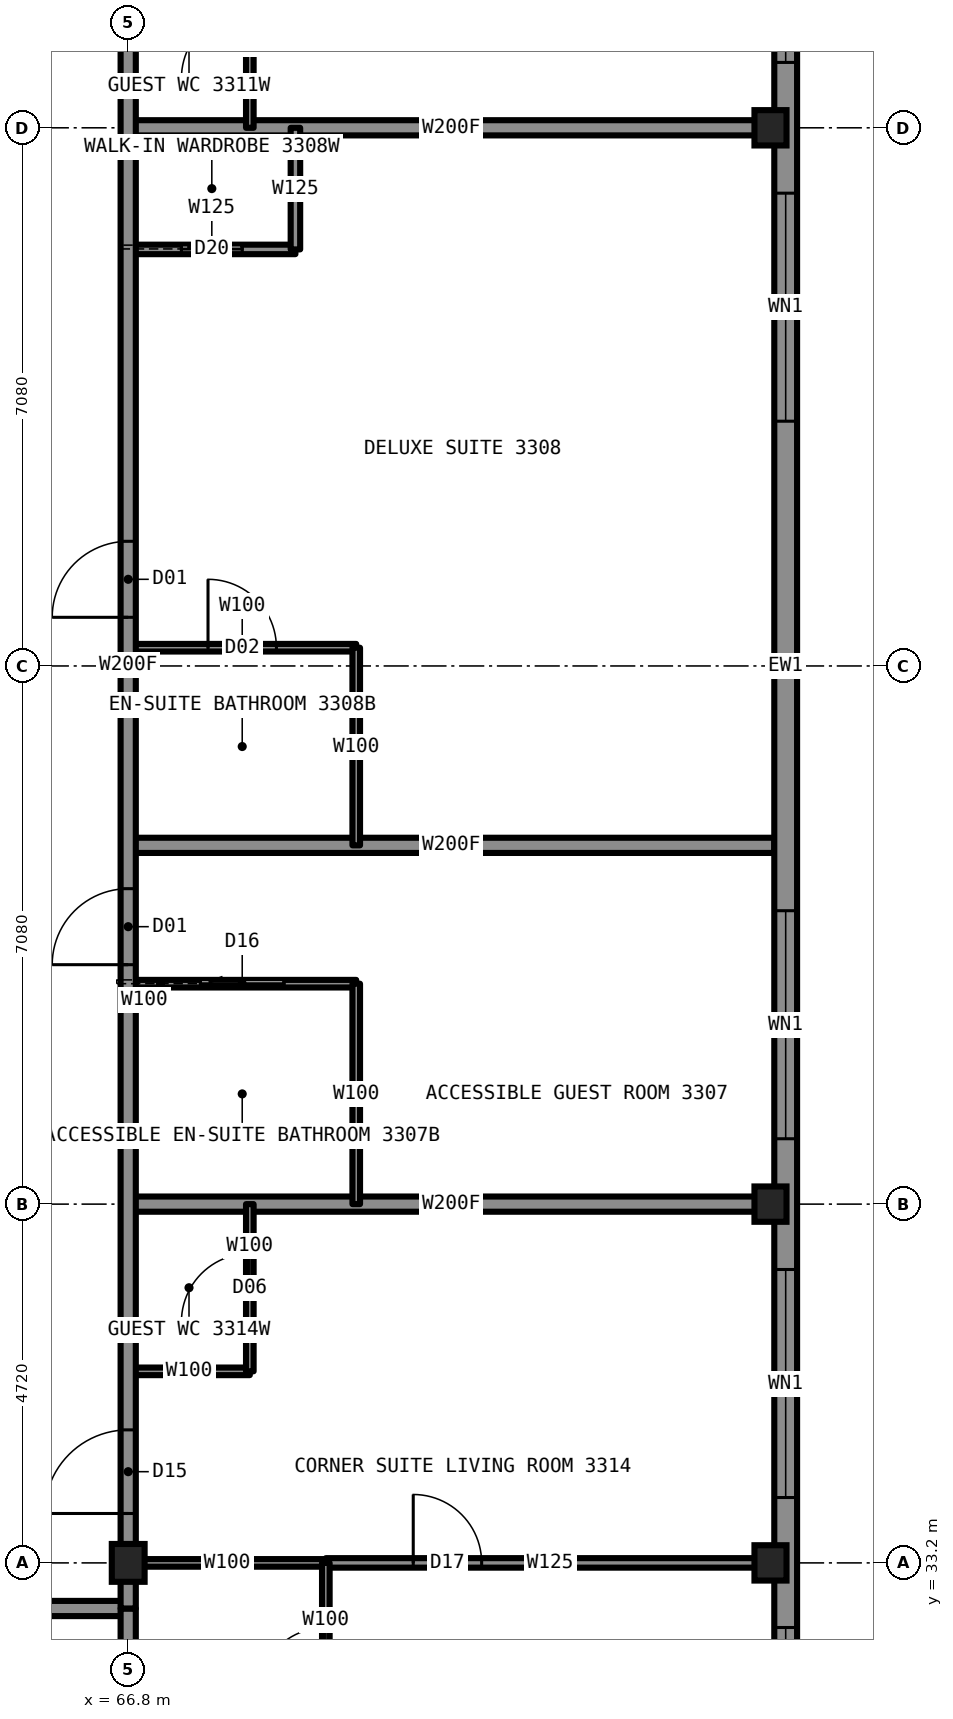
"""IFC4 building model, lengths in metres.
Left out: names, types, materials, properties, quantities, classifications, styles, units other than length and angle.
Written with IfcOpenShell. Run it as: python <this file> out.ifc"""

import sys

from ifc_helpers import new_model, si_unit, direction, frame, frame_2d, origin, origin_2d, place, context, subcontext, project, spatial, rectangle, i_section, extrude, element, fill, save


model = new_model("IFC4")
c1 = context("Model", 3, precision=1e-05, world=origin(), true_north=direction((0.0, 1.0)))
c2 = subcontext(c1, "Body", "Model", "MODEL_VIEW")
j1 = project(units=[si_unit("LENGTHUNIT", "METRE"), si_unit("PLANEANGLEUNIT", "RADIAN")], contexts=[c1])
p1 = place(None, origin())
s1 = spatial("IfcSite", under=j1, at=p1, CompositionType="ELEMENT")
p2 = place(p1, origin())
s2 = spatial("IfcBuilding", under=s1, at=p2, CompositionType="ELEMENT")
p3 = place(p2, frame((0.0, 0.0, 124.9)))
s3 = spatial("IfcBuildingStorey", under=s2, at=p3, CompositionType="ELEMENT", Elevation=124.9)
for number, where, z_axis, x_axis in (
    (1, (75.25, 33.2, 0.0), (0.0, 0.0, 1.0), (1.0, 0.0, 0.0)),
    (2, (75.25, 37.92, 0.0), (0.0, 0.0, 1.0), (1.0, 0.0, 0.0)),
    (3, (75.25, 52.08, 0.0), (0.0, 0.0, 1.0), (1.0, 0.0, 0.0)),
):
    element("IfcColumn", number, at=place(p3, frame(where, z_axis=z_axis, x_axis=x_axis)), inside=s3, PredefinedType="COLUMN", context=c2, shape_type="SweptSolid", body=[
        extrude(i_section(OverallWidth=0.422, OverallDepth=0.465, WebThickness=0.045, FlangeThickness=0.073, at=origin_2d()), origin(), (0.0, 0.0, 1.0), 3.5),
    ])
p4 = place(p3, frame((66.8, 33.2, 0.0), z_axis=(0.0, 0.0, 1.0), x_axis=(1.0, 0.0, 0.0)))
e4 = element("IfcColumn", 4, at=p4, inside=s3, PredefinedType="COLUMN", context=c2, shape_type="SweptSolid", body=[
    extrude(i_section(OverallWidth=0.432, OverallDepth=0.498, WebThickness=0.056, FlangeThickness=0.089, at=origin_2d()), origin(), (0.0, 0.0, 1.0), 3.5),
])
p5 = place(p3, frame((66.8, 33.2, 0.0), z_axis=(0.0, 0.0, 1.0), x_axis=(1.0, 0.0, 0.0)))
e5 = element("IfcWall", 5, at=p5, inside=s3, PredefinedType="PARTITIONING", context=c2, shape_type="SweptSolid", body=[
    extrude(rectangle(XDim=2.6, YDim=0.1, at=frame_2d((1.3, 0.0))), origin(), (0.0, 0.0, 1.0), 2.573),
])
p6 = place(p3, frame((69.4, 33.2, 0.0), z_axis=(0.0, 0.0, 1.0), x_axis=(1.0, 0.0, 0.0)))
e6 = element("IfcWall", 6, at=p6, inside=s3, PredefinedType="PARTITIONING", context=c2, shape_type="SweptSolid", body=[
    extrude(rectangle(XDim=5.9, YDim=0.125, at=frame_2d((2.95, 0.0))), origin(), (0.0, 0.0, 1.0), 2.573),
])
p7 = place(p6, frame((1.15, 0.0, 0.0)))
e7 = element("IfcOpeningElement", 7, at=p7, cuts=e6, PredefinedType="OPENING", context=c2, shape_type="SweptSolid", body=[
    extrude(rectangle(XDim=0.9, YDim=2.2, at=frame_2d((0.45, 1.1))), frame((0.0, 0.073, 0.0), z_axis=(0.0, -1.0, 0.0), x_axis=(1.0, 0.0, 0.0)), (0.0, 0.0, 1.0), 0.145),
])
p8 = place(p3, frame((43.2, 32.6, 0.0), z_axis=(0.0, 0.0, 1.0), x_axis=(1.0, 0.0, 0.0)))
e8 = element("IfcWall", 8, at=p8, inside=s3, PredefinedType="PARTITIONING", context=c2, shape_type="SweptSolid", body=[
    extrude(rectangle(XDim=23.6, YDim=0.2, at=frame_2d((11.8, 0.0))), origin(), (0.0, 0.0, 1.0), 3.33),
])
p9 = place(p8, frame((3.0, 0.0, 0.0)))
e9 = element("IfcOpeningElement", 9, at=p9, cuts=e8, PredefinedType="OPENING", context=c2, shape_type="SweptSolid", body=[
    extrude(rectangle(XDim=1.0, YDim=2.2, at=frame_2d((0.5, 1.1))), frame((0.0, 0.11, 0.0), z_axis=(0.0, -1.0, 0.0), x_axis=(1.0, 0.0, 0.0)), (0.0, 0.0, 1.0), 0.22),
])
p10 = place(p8, frame((11.29, 0.0, 0.0)))
e10 = element("IfcOpeningElement", 10, at=p10, cuts=e8, PredefinedType="OPENING", context=c2, shape_type="SweptSolid", body=[
    extrude(rectangle(XDim=1.1, YDim=2.2, at=frame_2d((0.55, 1.1))), frame((0.0, 0.11, 0.0), z_axis=(0.0, -1.0, 0.0), x_axis=(1.0, 0.0, 0.0)), (0.0, 0.0, 1.0), 0.22),
])
p11 = place(p3, frame((66.8, 42.64, 0.0), z_axis=(0.0, 0.0, 1.0), x_axis=(1.0, 0.0, 0.0)))
e11 = element("IfcWall", 11, at=p11, inside=s3, PredefinedType="PARTITIONING", context=c2, shape_type="SweptSolid", body=[
    extrude(rectangle(XDim=8.5, YDim=0.2, at=frame_2d((4.25, 0.0))), origin(), (0.0, 0.0, 1.0), 2.731),
])
p12 = place(p3, frame((66.8, 40.82, 0.0), z_axis=(0.0, 0.0, 1.0), x_axis=(1.0, 0.0, 0.0)))
e12 = element("IfcWall", 12, at=p12, inside=s3, PredefinedType="PARTITIONING", context=c2, shape_type="SweptSolid", body=[
    extrude(rectangle(XDim=3.0, YDim=0.1, at=frame_2d((1.5, 0.0))), origin(), (0.0, 0.0, 1.0), 3.33),
])
p13 = place(p12, frame((0.95, 0.0, 0.0)))
e13 = element("IfcOpeningElement", 13, at=p13, cuts=e12, PredefinedType="OPENING", context=c2, shape_type="SweptSolid", body=[
    extrude(rectangle(XDim=1.1, YDim=2.1, at=frame_2d((0.55, 1.05))), frame((0.0, 0.06, 0.0), z_axis=(0.0, -1.0, 0.0), x_axis=(1.0, 0.0, 0.0)), (0.0, 0.0, 1.0), 0.12),
])
p14 = place(p3, frame((66.8, 37.92, 0.0), z_axis=(0.0, 0.0, 1.0), x_axis=(1.0, 0.0, 0.0)))
e14 = element("IfcWall", 14, at=p14, inside=s3, PredefinedType="PARTITIONING", context=c2, shape_type="SweptSolid", body=[
    extrude(rectangle(XDim=8.5, YDim=0.2, at=frame_2d((4.25, 0.0))), origin(), (0.0, 0.0, 1.0), 2.573),
])
p15 = place(p3, frame((66.8, 35.72, 0.0), z_axis=(0.0, 0.0, 1.0), x_axis=(1.0, 0.0, 0.0)))
e15 = element("IfcWall", 15, at=p15, inside=s3, PredefinedType="PARTITIONING", context=c2, shape_type="SweptSolid", body=[
    extrude(rectangle(XDim=1.6, YDim=0.1, at=frame_2d((0.8, 0.0))), origin(), (0.0, 0.0, 1.0), 3.33),
])
p16 = place(p3, frame((66.8, 45.24, 0.0), z_axis=(0.0, 0.0, 1.0), x_axis=(1.0, 0.0, 0.0)))
e16 = element("IfcWall", 16, at=p16, inside=s3, PredefinedType="PARTITIONING", context=c2, shape_type="SweptSolid", body=[
    extrude(rectangle(XDim=3.0, YDim=0.1, at=frame_2d((1.5, 0.0))), origin(), (0.0, 0.0, 1.0), 3.33),
])
p17 = place(p16, frame((1.05, 0.0, 0.0)))
e17 = element("IfcOpeningElement", 17, at=p17, cuts=e16, PredefinedType="OPENING", context=c2, shape_type="SweptSolid", body=[
    extrude(rectangle(XDim=0.9, YDim=2.1, at=frame_2d((0.45, 1.05))), frame((0.0, 0.06, 0.0), z_axis=(0.0, -1.0, 0.0), x_axis=(1.0, 0.0, 0.0)), (0.0, 0.0, 1.0), 0.12),
])
p18 = place(p3, frame((66.8, 50.48, 0.0), z_axis=(0.0, 0.0, 1.0), x_axis=(1.0, 0.0, 0.0)))
e18 = element("IfcWall", 18, at=p18, inside=s3, PredefinedType="PARTITIONING", context=c2, shape_type="SweptSolid", body=[
    extrude(rectangle(XDim=2.2, YDim=0.125, at=frame_2d((1.1, 0.0))), origin(), (0.0, 0.0, 1.0), 3.33),
])
p19 = place(p18, frame((0.7, 0.0, 0.0)))
e19 = element("IfcOpeningElement", 19, at=p19, cuts=e18, PredefinedType="OPENING", context=c2, shape_type="SweptSolid", body=[
    extrude(rectangle(XDim=0.8, YDim=2.1, at=frame_2d((0.4, 1.05))), frame((0.0, 0.073, 0.0), z_axis=(0.0, -1.0, 0.0), x_axis=(1.0, 0.0, 0.0)), (0.0, 0.0, 1.0), 0.145),
])
p20 = place(p3, frame((66.8, 52.08, 0.0), z_axis=(0.0, 0.0, 1.0), x_axis=(1.0, 0.0, 0.0)))
e20 = element("IfcWall", 20, at=p20, inside=s3, PredefinedType="PARTITIONING", context=c2, shape_type="SweptSolid", body=[
    extrude(rectangle(XDim=8.5, YDim=0.2, at=frame_2d((4.25, 0.0))), origin(), (0.0, 0.0, 1.0), 2.573),
])
p21 = place(p3, frame((66.8, 33.22, 0.0), z_axis=(0.0, 0.0, 1.0), x_axis=(0.0, 1.0, 0.0)))
e21 = element("IfcWall", 21, at=p21, inside=s3, PredefinedType="PARTITIONING", context=c2, shape_type="SweptSolid", body=[
    extrude(rectangle(XDim=23.58, YDim=0.2, at=frame_2d((11.79, 0.0))), origin(), (0.0, 0.0, 1.0), 3.33),
])
p22 = place(p21, frame((7.85, 0.0, 0.0)))
e22 = element("IfcOpeningElement", 22, at=p22, cuts=e21, PredefinedType="OPENING", context=c2, shape_type="SweptSolid", body=[
    extrude(rectangle(XDim=1.0, YDim=2.2, at=frame_2d((0.5, 1.1))), frame((0.0, 0.11, 0.0), z_axis=(0.0, -1.0, 0.0), x_axis=(1.0, 0.0, 0.0)), (0.0, 0.0, 1.0), 0.22),
])
p23 = place(p21, frame((12.42, 0.0, 0.0)))
e23 = element("IfcOpeningElement", 23, at=p23, cuts=e21, PredefinedType="OPENING", context=c2, shape_type="SweptSolid", body=[
    extrude(rectangle(XDim=1.0, YDim=2.2, at=frame_2d((0.5, 1.1))), frame((0.0, 0.11, 0.0), z_axis=(0.0, -1.0, 0.0), x_axis=(1.0, 0.0, 0.0)), (0.0, 0.0, 1.0), 0.22),
])
p24 = place(p21, frame((21.83, 0.0, 0.0)))
e24 = element("IfcOpeningElement", 24, at=p24, cuts=e21, PredefinedType="OPENING", context=c2, shape_type="SweptSolid", body=[
    extrude(rectangle(XDim=1.1, YDim=2.2, at=frame_2d((0.55, 1.1))), frame((0.0, 0.11, 0.0), z_axis=(0.0, -1.0, 0.0), x_axis=(1.0, 0.0, 0.0)), (0.0, 0.0, 1.0), 0.22),
])
p25 = place(p21, frame((0.63, 0.0, 0.0)))
e25 = element("IfcOpeningElement", 25, at=p25, cuts=e21, PredefinedType="OPENING", context=c2, shape_type="SweptSolid", body=[
    extrude(rectangle(XDim=1.1, YDim=2.2, at=frame_2d((0.55, 1.1))), frame((0.0, 0.11, 0.0), z_axis=(0.0, -1.0, 0.0), x_axis=(1.0, 0.0, 0.0)), (0.0, 0.0, 1.0), 0.22),
])
p26 = place(p3, frame((66.8, 24.7, 0.0), z_axis=(0.0, 0.0, 1.0), x_axis=(0.0, 1.0, 0.0)))
e26 = element("IfcWall", 26, at=p26, inside=s3, PredefinedType="PARTITIONING", context=c2, shape_type="SweptSolid", body=[
    extrude(rectangle(XDim=7.9, YDim=0.2, at=frame_2d((3.95, 0.0))), origin(), (0.0, 0.0, 1.0), 2.573),
])
p27 = place(p3, frame((68.4, 35.72, 0.0), z_axis=(0.0, 0.0, 1.0), x_axis=(0.0, 1.0, 0.0)))
e27 = element("IfcWall", 27, at=p27, inside=s3, PredefinedType="PARTITIONING", context=c2, shape_type="SweptSolid", body=[
    extrude(rectangle(XDim=2.2, YDim=0.1, at=frame_2d((1.1, 0.0))), origin(), (0.0, 0.0, 1.0), 3.33),
])
p28 = place(p27, frame((0.65, 0.0, 0.0)))
e28 = element("IfcOpeningElement", 28, at=p28, cuts=e27, PredefinedType="OPENING", context=c2, shape_type="SweptSolid", body=[
    extrude(rectangle(XDim=0.9, YDim=2.1, at=frame_2d((0.45, 1.05))), frame((0.0, 0.06, 0.0), z_axis=(0.0, -1.0, 0.0), x_axis=(1.0, 0.0, 0.0)), (0.0, 0.0, 1.0), 0.12),
])
p29 = place(p3, frame((68.4, 52.08, 0.0), z_axis=(0.0, 0.0, 1.0), x_axis=(0.0, 1.0, 0.0)))
e29 = element("IfcWall", 29, at=p29, inside=s3, PredefinedType="PARTITIONING", context=c2, shape_type="SweptSolid", body=[
    extrude(rectangle(XDim=2.2, YDim=0.1, at=frame_2d((1.1, 0.0))), origin(), (0.0, 0.0, 1.0), 3.33),
])
p30 = place(p29, frame((0.65, 0.0, 0.0)))
e30 = element("IfcOpeningElement", 30, at=p30, cuts=e29, PredefinedType="OPENING", context=c2, shape_type="SweptSolid", body=[
    extrude(rectangle(XDim=0.9, YDim=2.1, at=frame_2d((0.45, 1.05))), frame((0.0, 0.06, 0.0), z_axis=(0.0, -1.0, 0.0), x_axis=(1.0, 0.0, 0.0)), (0.0, 0.0, 1.0), 0.12),
])
p31 = place(p3, frame((69.0, 50.48, 0.0), z_axis=(0.0, 0.0, 1.0), x_axis=(0.0, 1.0, 0.0)))
e31 = element("IfcWall", 31, at=p31, inside=s3, PredefinedType="PARTITIONING", context=c2, shape_type="SweptSolid", body=[
    extrude(rectangle(XDim=1.6, YDim=0.125, at=frame_2d((0.8, 0.0))), origin(), (0.0, 0.0, 1.0), 3.33),
])
p32 = place(p3, frame((69.4, 30.6, 0.0), z_axis=(0.0, 0.0, 1.0), x_axis=(0.0, 1.0, 0.0)))
e32 = element("IfcWall", 32, at=p32, inside=s3, PredefinedType="PARTITIONING", context=c2, shape_type="SweptSolid", body=[
    extrude(rectangle(XDim=2.6, YDim=0.1, at=frame_2d((1.3, 0.0))), origin(), (0.0, 0.0, 1.0), 3.33),
])
p33 = place(p32, frame((0.85, 0.0, 0.0)))
e33 = element("IfcOpeningElement", 33, at=p33, cuts=e32, PredefinedType="OPENING", context=c2, shape_type="SweptSolid", body=[
    extrude(rectangle(XDim=0.9, YDim=2.1, at=frame_2d((0.45, 1.05))), frame((0.0, 0.06, 0.0), z_axis=(0.0, -1.0, 0.0), x_axis=(1.0, 0.0, 0.0)), (0.0, 0.0, 1.0), 0.12),
])
p34 = place(p3, frame((69.8, 37.92, 0.0), z_axis=(0.0, 0.0, 1.0), x_axis=(0.0, 1.0, 0.0)))
e34 = element("IfcWall", 34, at=p34, inside=s3, PredefinedType="PARTITIONING", context=c2, shape_type="SweptSolid", body=[
    extrude(rectangle(XDim=2.9, YDim=0.1, at=frame_2d((1.45, 0.0))), origin(), (0.0, 0.0, 1.0), 3.33),
])
p35 = place(p3, frame((69.8, 42.64, 0.0), z_axis=(0.0, 0.0, 1.0), x_axis=(0.0, 1.0, 0.0)))
e35 = element("IfcWall", 35, at=p35, inside=s3, PredefinedType="PARTITIONING", context=c2, shape_type="SweptSolid", body=[
    extrude(rectangle(XDim=2.6, YDim=0.1, at=frame_2d((1.3, 0.0))), origin(), (0.0, 0.0, 1.0), 3.33),
])
p36 = place(p3, frame((75.45, 29.9, 0.0), z_axis=(0.0, 0.0, 1.0), x_axis=(0.0, 1.0, 0.0)))
e36 = element("IfcWall", 36, at=p36, inside=s3, PredefinedType="SOLIDWALL", context=c2, shape_type="SweptSolid", body=[
    extrude(rectangle(XDim=30.2, YDim=0.3, at=frame_2d((15.1, 0.0))), origin(), (0.0, 0.0, 1.0), 2.83),
])
p37 = place(p36, frame((0.85, 0.0, 0.5)))
e37 = element("IfcOpeningElement", 37, at=p37, cuts=e36, PredefinedType="OPENING", context=c2, shape_type="SweptSolid", body=[
    extrude(rectangle(XDim=1.6, YDim=2.0, at=frame_2d((0.8, 1.0))), frame((0.0, 0.16, 0.0), z_axis=(0.0, -1.0, 0.0), x_axis=(1.0, 0.0, 0.0)), (0.0, 0.0, 1.0), 0.32),
])
p38 = place(p36, frame((4.16, 0.0, 0.5)))
e38 = element("IfcOpeningElement", 38, at=p38, cuts=e36, PredefinedType="OPENING", context=c2, shape_type="SweptSolid", body=[
    extrude(rectangle(XDim=3.0, YDim=2.0, at=frame_2d((1.5, 1.0))), frame((0.0, 0.16, 0.0), z_axis=(0.0, -1.0, 0.0), x_axis=(1.0, 0.0, 0.0)), (0.0, 0.0, 1.0), 0.32),
])
p39 = place(p36, frame((8.88, 0.0, 0.5)))
e39 = element("IfcOpeningElement", 39, at=p39, cuts=e36, PredefinedType="OPENING", context=c2, shape_type="SweptSolid", body=[
    extrude(rectangle(XDim=3.0, YDim=2.0, at=frame_2d((1.5, 1.0))), frame((0.0, 0.16, 0.0), z_axis=(0.0, -1.0, 0.0), x_axis=(1.0, 0.0, 0.0)), (0.0, 0.0, 1.0), 0.32),
])
p40 = place(p36, frame((18.32, 0.0, 0.5)))
e40 = element("IfcOpeningElement", 40, at=p40, cuts=e36, PredefinedType="OPENING", context=c2, shape_type="SweptSolid", body=[
    extrude(rectangle(XDim=3.0, YDim=2.0, at=frame_2d((1.5, 1.0))), frame((0.0, 0.16, 0.0), z_axis=(0.0, -1.0, 0.0), x_axis=(1.0, 0.0, 0.0)), (0.0, 0.0, 1.0), 0.32),
])
p41 = place(p36, frame((23.04, 0.0, 0.5)))
e41 = element("IfcOpeningElement", 41, at=p41, cuts=e36, PredefinedType="OPENING", context=c2, shape_type="SweptSolid", body=[
    extrude(rectangle(XDim=3.0, YDim=2.0, at=frame_2d((1.5, 1.0))), frame((0.0, 0.16, 0.0), z_axis=(0.0, -1.0, 0.0), x_axis=(1.0, 0.0, 0.0)), (0.0, 0.0, 1.0), 0.32),
])
p42 = place(p36, frame((27.75, 0.0, 0.5)))
e42 = element("IfcOpeningElement", 42, at=p42, cuts=e36, PredefinedType="OPENING", context=c2, shape_type="SweptSolid", body=[
    extrude(rectangle(XDim=1.6, YDim=2.0, at=frame_2d((0.8, 1.0))), frame((0.0, 0.16, 0.0), z_axis=(0.0, -1.0, 0.0), x_axis=(1.0, 0.0, 0.0)), (0.0, 0.0, 1.0), 0.32),
])
p43 = place(p3, frame((66.8, 32.6, 0.0), z_axis=(0.0, 0.0, 1.0), x_axis=(0.0, 1.0, 0.0)))
e43 = element("IfcWall", 43, at=p43, inside=s3, PredefinedType="PARTITIONING", context=c2, shape_type="SweptSolid", body=[
    extrude(rectangle(XDim=0.62, YDim=0.2, at=frame_2d((0.31, 0.0))), origin(), (0.0, 0.0, 1.0), 2.573),
])
p44 = place(p22, origin())
e44 = element("IfcDoor", 44, at=p44, inside=s3, OperationType="SINGLE_SWING_LEFT", PredefinedType="DOOR", context=c2, shape_type="SweptSolid", body=[
    extrude(rectangle(XDim=1.0, YDim=2.2, at=frame_2d((0.5, 1.1))), frame((0.0, 0.025, 0.0), z_axis=(0.0, -1.0, 0.0), x_axis=(1.0, 0.0, 0.0)), (0.0, 0.0, 1.0), 0.05),
])
fill(e22, e44)
p45 = place(p13, origin())
e45 = element("IfcDoor", 45, at=p45, inside=s3, OperationType="SLIDING_TO_LEFT", PredefinedType="DOOR", context=c2, shape_type="SweptSolid", body=[
    extrude(rectangle(XDim=1.1, YDim=2.1, at=frame_2d((0.55, 1.05))), frame((0.0, 0.025, 0.0), z_axis=(0.0, -1.0, 0.0), x_axis=(1.0, 0.0, 0.0)), (0.0, 0.0, 1.0), 0.05),
])
fill(e13, e45)
p46 = place(p23, origin())
e46 = element("IfcDoor", 46, at=p46, inside=s3, OperationType="SINGLE_SWING_LEFT", PredefinedType="DOOR", context=c2, shape_type="SweptSolid", body=[
    extrude(rectangle(XDim=1.0, YDim=2.2, at=frame_2d((0.5, 1.1))), frame((0.0, 0.025, 0.0), z_axis=(0.0, -1.0, 0.0), x_axis=(1.0, 0.0, 0.0)), (0.0, 0.0, 1.0), 0.05),
])
fill(e23, e46)
p47 = place(p17, origin())
e47 = element("IfcDoor", 47, at=p47, inside=s3, OperationType="SINGLE_SWING_RIGHT", PredefinedType="DOOR", context=c2, shape_type="SweptSolid", body=[
    extrude(rectangle(XDim=0.9, YDim=2.1, at=frame_2d((0.45, 1.05))), frame((0.0, 0.025, 0.0), z_axis=(0.0, -1.0, 0.0), x_axis=(1.0, 0.0, 0.0)), (0.0, 0.0, 1.0), 0.05),
])
fill(e17, e47)
p48 = place(p19, origin())
e48 = element("IfcDoor", 48, at=p48, inside=s3, OperationType="SLIDING_TO_LEFT", PredefinedType="DOOR", context=c2, shape_type="SweptSolid", body=[
    extrude(rectangle(XDim=0.8, YDim=2.1, at=frame_2d((0.4, 1.05))), frame((0.0, 0.025, 0.0), z_axis=(0.0, -1.0, 0.0), x_axis=(1.0, 0.0, 0.0)), (0.0, 0.0, 1.0), 0.05),
])
fill(e19, e48)
p49 = place(p30, origin())
e49 = element("IfcDoor", 49, at=p49, inside=s3, OperationType="SINGLE_SWING_LEFT", PredefinedType="DOOR", context=c2, shape_type="SweptSolid", body=[
    extrude(rectangle(XDim=0.9, YDim=2.1, at=frame_2d((0.45, 1.05))), frame((0.0, 0.025, 0.0), z_axis=(0.0, -1.0, 0.0), x_axis=(1.0, 0.0, 0.0)), (0.0, 0.0, 1.0), 0.05),
])
fill(e30, e49)
p50 = place(p25, origin())
e50 = element("IfcDoor", 50, at=p50, inside=s3, OperationType="SINGLE_SWING_LEFT", PredefinedType="DOOR", context=c2, shape_type="SweptSolid", body=[
    extrude(rectangle(XDim=1.1, YDim=2.2, at=frame_2d((0.55, 1.1))), frame((0.0, 0.025, 0.0), z_axis=(0.0, -1.0, 0.0), x_axis=(1.0, 0.0, 0.0)), (0.0, 0.0, 1.0), 0.05),
])
fill(e25, e50)
p51 = place(p33, origin())
e51 = element("IfcDoor", 51, at=p51, inside=s3, OperationType="SINGLE_SWING_RIGHT", PredefinedType="DOOR", context=c2, shape_type="SweptSolid", body=[
    extrude(rectangle(XDim=0.9, YDim=2.1, at=frame_2d((0.45, 1.05))), frame((0.0, 0.025, 0.0), z_axis=(0.0, -1.0, 0.0), x_axis=(1.0, 0.0, 0.0)), (0.0, 0.0, 1.0), 0.05),
])
fill(e33, e51)
p52 = place(p7, origin())
e52 = element("IfcDoor", 52, at=p52, inside=s3, OperationType="SINGLE_SWING_LEFT", PredefinedType="DOOR", context=c2, shape_type="SweptSolid", body=[
    extrude(rectangle(XDim=0.9, YDim=2.2, at=frame_2d((0.45, 1.1))), frame((0.0, 0.025, 0.0), z_axis=(0.0, -1.0, 0.0), x_axis=(1.0, 0.0, 0.0)), (0.0, 0.0, 1.0), 0.05),
])
fill(e7, e52)
p53 = place(p28, origin())
e53 = element("IfcDoor", 53, at=p53, inside=s3, OperationType="SINGLE_SWING_LEFT", PredefinedType="DOOR", context=c2, shape_type="SweptSolid", body=[
    extrude(rectangle(XDim=0.9, YDim=2.1, at=frame_2d((0.45, 1.05))), frame((0.0, 0.025, 0.0), z_axis=(0.0, -1.0, 0.0), x_axis=(1.0, 0.0, 0.0)), (0.0, 0.0, 1.0), 0.05),
])
fill(e28, e53)
p54 = place(p37, origin())
e54 = element("IfcWindow", 54, at=p54, inside=s3, PartitioningType="SINGLE_PANEL", PredefinedType="WINDOW", context=c2, shape_type="SweptSolid", body=[
    extrude(rectangle(XDim=1.6, YDim=2.0, at=frame_2d((0.8, 1.0))), frame((0.0, 0.03, 0.0), z_axis=(0.0, -1.0, 0.0), x_axis=(1.0, 0.0, 0.0)), (0.0, 0.0, 1.0), 0.06),
])
fill(e37, e54)
p55 = place(p38, origin())
e55 = element("IfcWindow", 55, at=p55, inside=s3, PartitioningType="SINGLE_PANEL", PredefinedType="WINDOW", context=c2, shape_type="SweptSolid", body=[
    extrude(rectangle(XDim=3.0, YDim=2.0, at=frame_2d((1.5, 1.0))), frame((0.0, 0.03, 0.0), z_axis=(0.0, -1.0, 0.0), x_axis=(1.0, 0.0, 0.0)), (0.0, 0.0, 1.0), 0.06),
])
fill(e38, e55)
p56 = place(p39, origin())
e56 = element("IfcWindow", 56, at=p56, inside=s3, PartitioningType="SINGLE_PANEL", PredefinedType="WINDOW", context=c2, shape_type="SweptSolid", body=[
    extrude(rectangle(XDim=3.0, YDim=2.0, at=frame_2d((1.5, 1.0))), frame((0.0, 0.03, 0.0), z_axis=(0.0, -1.0, 0.0), x_axis=(1.0, 0.0, 0.0)), (0.0, 0.0, 1.0), 0.06),
])
fill(e39, e56)
p57 = place(p40, origin())
e57 = element("IfcWindow", 57, at=p57, inside=s3, PartitioningType="SINGLE_PANEL", PredefinedType="WINDOW", context=c2, shape_type="SweptSolid", body=[
    extrude(rectangle(XDim=3.0, YDim=2.0, at=frame_2d((1.5, 1.0))), frame((0.0, 0.03, 0.0), z_axis=(0.0, -1.0, 0.0), x_axis=(1.0, 0.0, 0.0)), (0.0, 0.0, 1.0), 0.06),
])
fill(e40, e57)
p58 = place(p41, origin())
e58 = element("IfcWindow", 58, at=p58, inside=s3, PartitioningType="SINGLE_PANEL", PredefinedType="WINDOW", context=c2, shape_type="SweptSolid", body=[
    extrude(rectangle(XDim=3.0, YDim=2.0, at=frame_2d((1.5, 1.0))), frame((0.0, 0.03, 0.0), z_axis=(0.0, -1.0, 0.0), x_axis=(1.0, 0.0, 0.0)), (0.0, 0.0, 1.0), 0.06),
])
fill(e41, e58)
save(model, sys.argv[1])
